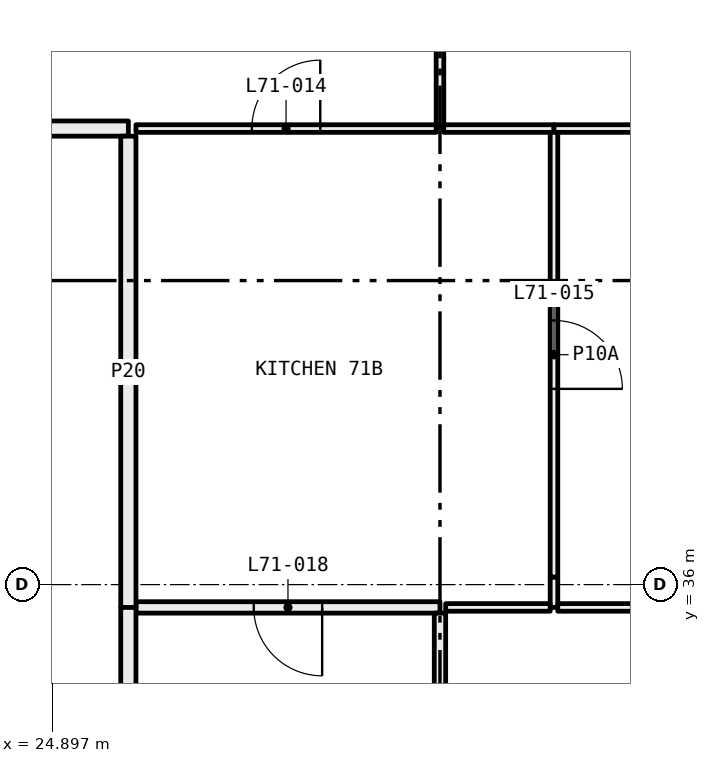
"""IFC4 building model, lengths in metres.
Left out: names, types, materials, properties, quantities, classifications, styles, units other than length and angle.
Written with IfcOpenShell. Run it as: python <this file> out.ifc"""

import sys

from ifc_helpers import new_model, si_unit, direction, frame, frame_2d, origin, place, context, subcontext, project, spatial, rectangle, extrude, element, fill, save


model = new_model("IFC4")
c1 = context("Model", 3, precision=1e-05, world=origin(), true_north=direction((0.0, 1.0)))
c2 = subcontext(c1, "Body", "Model", "MODEL_VIEW")
j1 = project(units=[si_unit("LENGTHUNIT", "METRE"), si_unit("PLANEANGLEUNIT", "RADIAN")], contexts=[c1])
p1 = place(None, origin())
s1 = spatial("IfcSite", under=j1, at=p1, CompositionType="ELEMENT")
p2 = place(p1, origin())
s2 = spatial("IfcBuilding", under=s1, at=p2, CompositionType="ELEMENT")
p3 = place(p2, frame((0.0, 0.0, 262.8)))
s3 = spatial("IfcBuildingStorey", under=s2, at=p3, CompositionType="ELEMENT", Elevation=262.8)
p4 = place(p3, frame((30.0, 42.0, 0.0), z_axis=(0.0, 0.0, 1.0), x_axis=(0.0, 1.0, 0.0)))
e1 = element("IfcWall", 1, at=p4, inside=s3, PredefinedType="PARTITIONING", context=c2, shape_type="SweptSolid", body=[
    extrude(rectangle(XDim=5.28, YDim=0.1, at=frame_2d((2.64, 0.0))), origin(), (0.0, 0.0, 1.0), 3.05),
])
p5 = place(p4, frame((2.19, 0.0, 0.0)))
e2 = element("IfcOpeningElement", 2, at=p5, cuts=e1, PredefinedType="OPENING", context=c2, shape_type="SweptSolid", body=[
    extrude(rectangle(XDim=0.9, YDim=2.1, at=frame_2d((0.45, 1.05))), frame((0.0, 0.06, 0.0), z_axis=(0.0, -1.0, 0.0), x_axis=(1.0, 0.0, 0.0)), (0.0, 0.0, 1.0), 0.12),
])
p6 = place(p3, frame((26.0, 42.0, 0.0), z_axis=(0.0, 0.0, 1.0), x_axis=(1.0, 0.0, 0.0)))
e3 = element("IfcWall", 3, at=p6, inside=s3, PredefinedType="PARTITIONING", context=c2, shape_type="SweptSolid", body=[
    extrude(rectangle(XDim=3.95, YDim=0.1, at=frame_2d((1.975, 0.0))), origin(), (0.0, 0.0, 1.0), 3.05),
])
p7 = place(p6, frame((1.525, 0.0, 0.0)))
e4 = element("IfcOpeningElement", 4, at=p7, cuts=e3, PredefinedType="OPENING", context=c2, shape_type="SweptSolid", body=[
    extrude(rectangle(XDim=0.9, YDim=2.1, at=frame_2d((0.45, 1.05))), frame((0.0, 0.06, 0.0), z_axis=(0.0, -1.0, 0.0), x_axis=(1.0, 0.0, 0.0)), (0.0, 0.0, 1.0), 0.12),
])
p8 = place(p3, frame((24.0, 42.0, 0.0), z_axis=(0.0, 0.0, 1.0), x_axis=(1.0, 0.0, 0.0)))
e5 = element("IfcWall", 5, at=p8, inside=s3, PredefinedType="PARTITIONING", context=c2, shape_type="SweptSolid", body=[
    extrude(rectangle(XDim=1.9, YDim=0.2, at=frame_2d((0.95, 0.0))), origin(), (0.0, 0.0, 1.0), 3.05),
])
p9 = place(p3, frame((30.05, 42.0, 0.0), z_axis=(0.0, 0.0, 1.0), x_axis=(1.0, 0.0, 0.0)))
e6 = element("IfcWall", 6, at=p9, inside=s3, PredefinedType="PARTITIONING", context=c2, shape_type="SweptSolid", body=[
    extrude(rectangle(XDim=1.45, YDim=0.1, at=frame_2d((0.725, 0.0))), origin(), (0.0, 0.0, 1.0), 3.05),
])
p10 = place(p3, frame((31.5, 42.0, 0.0), z_axis=(0.0, 0.0, 1.0), x_axis=(1.0, 0.0, 0.0)))
e7 = element("IfcWall", 7, at=p10, inside=s3, PredefinedType="PARTITIONING", context=c2, shape_type="SweptSolid", body=[
    extrude(rectangle(XDim=4.425, YDim=0.1, at=frame_2d((2.212, 0.0))), origin(), (0.0, 0.0, 1.0), 2.45),
])
p11 = place(p3, frame((31.5, 35.7, 0.0), z_axis=(0.0, 0.0, 1.0), x_axis=(0.0, 1.0, 0.0)))
e8 = element("IfcWall", 8, at=p11, inside=s3, PredefinedType="PARTITIONING", context=c2, shape_type="SweptSolid", body=[
    extrude(rectangle(XDim=0.4, YDim=0.1, at=frame_2d((0.2, 0.0))), origin(), (0.0, 0.0, 1.0), 2.45),
])
p12 = place(p3, frame((31.5, 36.1, 0.0), z_axis=(0.0, 0.0, 1.0), x_axis=(0.0, 1.0, 0.0)))
e9 = element("IfcWall", 9, at=p12, inside=s3, PredefinedType="PARTITIONING", context=c2, shape_type="SweptSolid", body=[
    extrude(rectangle(XDim=5.85, YDim=0.1, at=frame_2d((2.925, 0.0))), origin(), (0.0, 0.0, 1.0), 3.05),
])
p13 = place(p12, frame((2.475, 0.0, 0.0)))
e10 = element("IfcOpeningElement", 10, at=p13, cuts=e9, PredefinedType="OPENING", context=c2, shape_type="SweptSolid", body=[
    extrude(rectangle(XDim=0.9, YDim=2.1, at=frame_2d((0.45, 1.05))), frame((0.0, 0.06, 0.0), z_axis=(0.0, -1.0, 0.0), x_axis=(1.0, 0.0, 0.0)), (0.0, 0.0, 1.0), 0.12),
])
p14 = place(p3, frame((26.0, 35.7, 0.0), z_axis=(0.0, 0.0, 1.0), x_axis=(1.0, 0.0, 0.0)))
e11 = element("IfcWall", 11, at=p14, inside=s3, PredefinedType="PARTITIONING", context=c2, shape_type="SweptSolid", body=[
    extrude(rectangle(XDim=4.0, YDim=0.15, at=frame_2d((2.0, 0.0))), origin(), (0.0, 0.0, 1.0), 3.05),
])
p15 = place(p14, frame((1.55, 0.0, 0.0)))
e12 = element("IfcOpeningElement", 12, at=p15, cuts=e11, PredefinedType="OPENING", context=c2, shape_type="SweptSolid", body=[
    extrude(rectangle(XDim=0.9, YDim=2.1, at=frame_2d((0.45, 1.05))), frame((0.0, 0.085, 0.0), z_axis=(0.0, -1.0, 0.0), x_axis=(1.0, 0.0, 0.0)), (0.0, 0.0, 1.0), 0.17),
])
p16 = place(p3, frame((30.075, 35.7, 0.0), z_axis=(0.0, 0.0, 1.0), x_axis=(1.0, 0.0, 0.0)))
e13 = element("IfcWall", 13, at=p16, inside=s3, PredefinedType="PARTITIONING", context=c2, shape_type="SweptSolid", body=[
    extrude(rectangle(XDim=1.375, YDim=0.1, at=frame_2d((0.688, 0.0))), origin(), (0.0, 0.0, 1.0), 3.05),
])
p17 = place(p3, frame((25.9, 41.9, 0.0), z_axis=(0.0, 0.0, 1.0), x_axis=(0.0, -1.0, 0.0)))
e14 = element("IfcWall", 14, at=p17, inside=s3, PredefinedType="PARTITIONING", context=c2, shape_type="SweptSolid", body=[
    extrude(rectangle(XDim=6.2, YDim=0.2, at=frame_2d((3.1, 0.0))), origin(), (0.0, 0.0, 1.0), 2.45),
])
p18 = place(p3, frame((31.55, 35.7, 0.0), z_axis=(0.0, 0.0, 1.0), x_axis=(1.0, 0.0, 0.0)))
e15 = element("IfcWall", 15, at=p18, inside=s3, PredefinedType="PARTITIONING", context=c2, shape_type="SweptSolid", body=[
    extrude(rectangle(XDim=3.9, YDim=0.1, at=frame_2d((1.95, 0.0))), origin(), (0.0, 0.0, 1.0), 3.05),
])
p19 = place(p18, frame((1.5, 0.0, 0.0)))
e16 = element("IfcOpeningElement", 16, at=p19, cuts=e15, PredefinedType="OPENING", context=c2, shape_type="SweptSolid", body=[
    extrude(rectangle(XDim=0.9, YDim=2.1, at=frame_2d((0.45, 1.05))), frame((0.0, 0.06, 0.0), z_axis=(0.0, -1.0, 0.0), x_axis=(1.0, 0.0, 0.0)), (0.0, 0.0, 1.0), 0.12),
])
p20 = place(p3, frame((30.0, 31.3, 0.0), z_axis=(0.0, 0.0, 1.0), x_axis=(0.0, 1.0, 0.0)))
e17 = element("IfcWall", 17, at=p20, inside=s3, PredefinedType="PARTITIONING", context=c2, shape_type="SweptSolid", body=[
    extrude(rectangle(XDim=4.325, YDim=0.15, at=frame_2d((2.163, 0.0))), origin(), (0.0, 0.0, 1.0), 3.05),
])
p21 = place(p3, frame((25.9, 35.7, 0.0), z_axis=(0.0, 0.0, 1.0), x_axis=(0.0, -1.0, 0.0)))
e18 = element("IfcWall", 18, at=p21, inside=s3, PredefinedType="PARTITIONING", context=c2, shape_type="SweptSolid", body=[
    extrude(rectangle(XDim=4.5, YDim=0.2, at=frame_2d((2.25, 0.0))), origin(), (0.0, 0.0, 1.0), 3.05),
])
p22 = place(p7, origin())
e19 = element("IfcDoor", 19, at=p22, inside=s3, OperationType="SINGLE_SWING_LEFT", PredefinedType="DOOR", context=c2, shape_type="SweptSolid", body=[
    extrude(rectangle(XDim=0.9, YDim=2.1, at=frame_2d((0.45, 1.05))), frame((0.0, 0.025, 0.0), z_axis=(0.0, -1.0, 0.0), x_axis=(1.0, 0.0, 0.0)), (0.0, 0.0, 1.0), 0.05),
])
fill(e4, e19)
p23 = place(p13, frame((0.9, 0.0, 0.0), x_axis=(-1.0, 0.0, 0.0)))
e20 = element("IfcDoor", 20, at=p23, inside=s3, OperationType="SINGLE_SWING_LEFT", PredefinedType="DOOR", context=c2, shape_type="SweptSolid", body=[
    extrude(rectangle(XDim=0.9, YDim=2.1, at=frame_2d((0.45, 1.05))), frame((0.0, 0.025, 0.0), z_axis=(0.0, -1.0, 0.0), x_axis=(1.0, 0.0, 0.0)), (0.0, 0.0, 1.0), 0.05),
])
fill(e10, e20)
p24 = place(p15, frame((0.9, 0.0, 0.0), x_axis=(-1.0, 0.0, 0.0)))
e21 = element("IfcDoor", 21, at=p24, inside=s3, OperationType="SINGLE_SWING_RIGHT", PredefinedType="DOOR", context=c2, shape_type="SweptSolid", body=[
    extrude(rectangle(XDim=0.9, YDim=2.1, at=frame_2d((0.45, 1.05))), frame((0.0, 0.025, 0.0), z_axis=(0.0, -1.0, 0.0), x_axis=(1.0, 0.0, 0.0)), (0.0, 0.0, 1.0), 0.05),
])
fill(e12, e21)
save(model, sys.argv[1])
